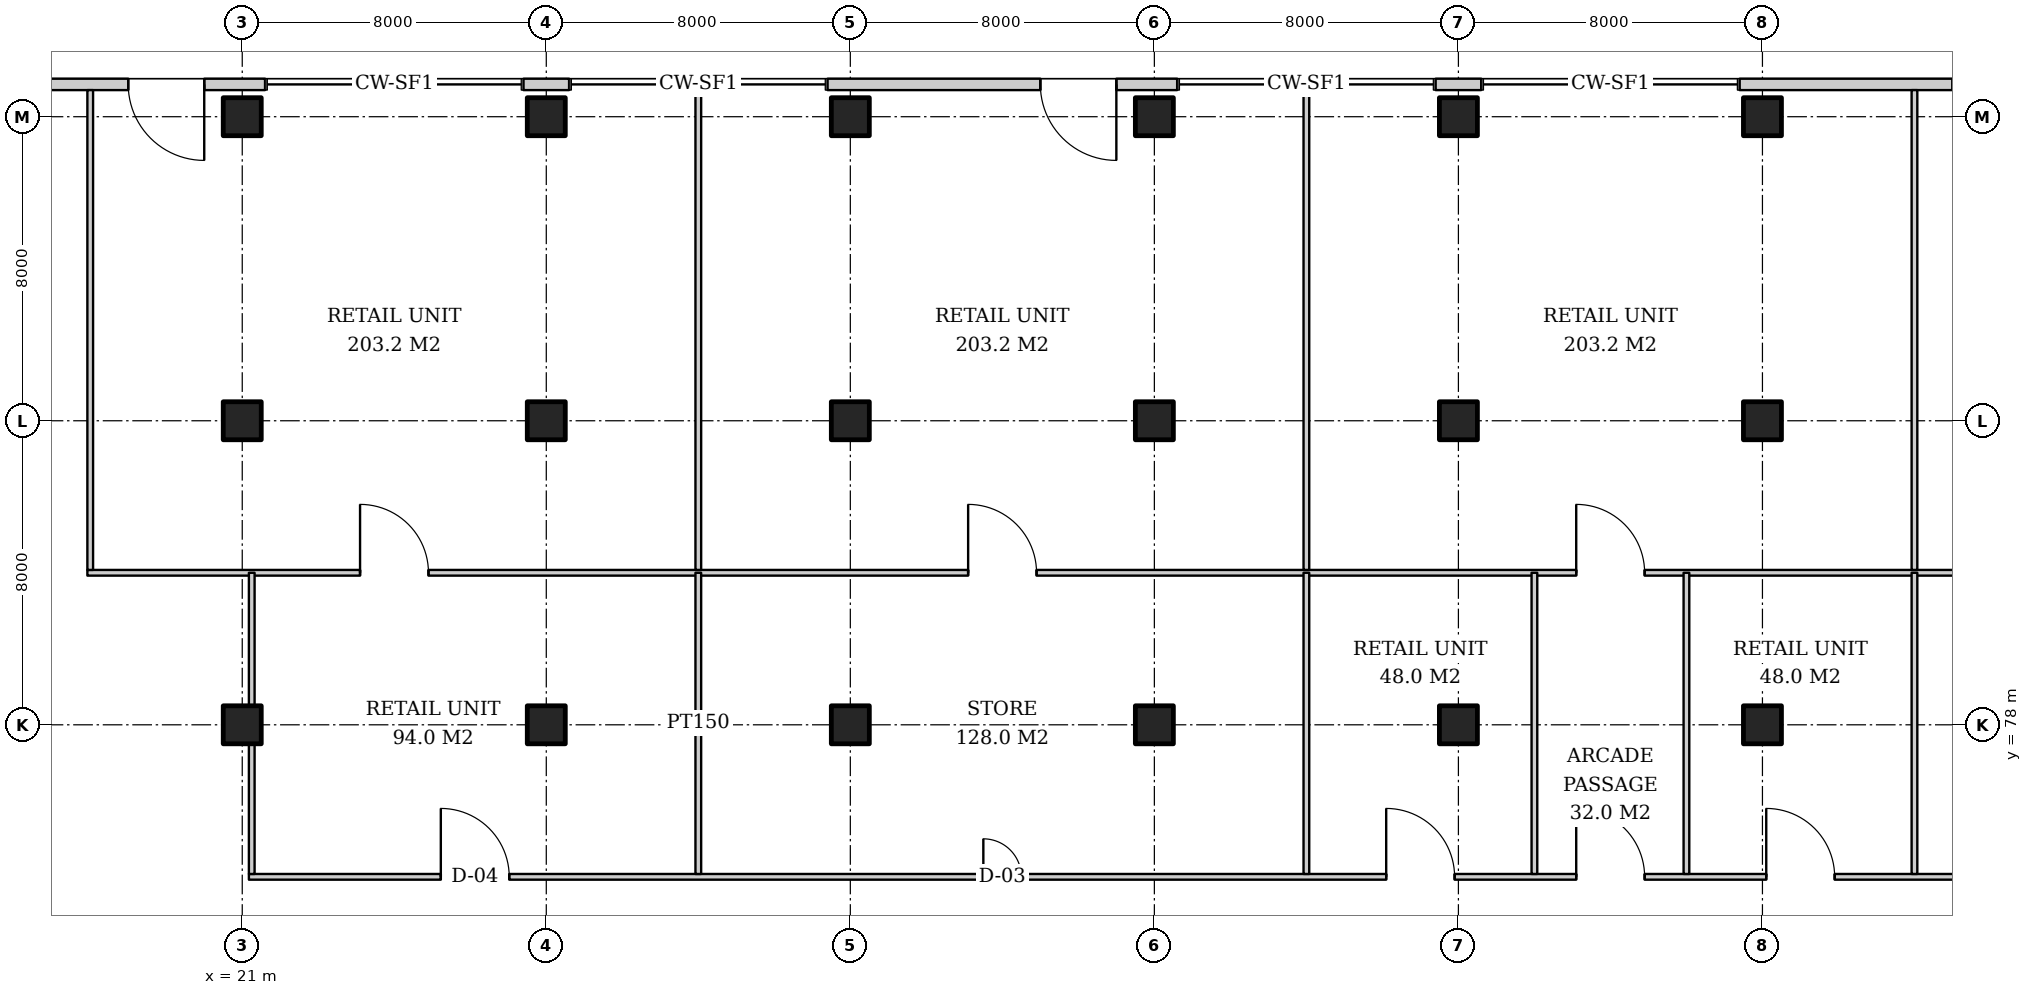
"""IFC4 building model, lengths in metres.
Left out: names, types, materials, properties, quantities, classifications, styles, units other than length and angle.
Written with IfcOpenShell. Run it as: python <this file> out.ifc"""

import sys

from ifc_helpers import new_model, si_unit, direction, frame, frame_2d, origin, origin_2d, place, context, subcontext, project, spatial, rectangle, extrude, element, fill, save


model = new_model("IFC4")
c1 = context("Model", 3, precision=1e-05, world=origin(), true_north=direction((0.0, 1.0)))
c2 = subcontext(c1, "Body", "Model", "MODEL_VIEW")
j1 = project(units=[si_unit("LENGTHUNIT", "METRE"), si_unit("PLANEANGLEUNIT", "RADIAN")], contexts=[c1])
p1 = place(None, origin())
s1 = spatial("IfcSite", under=j1, at=p1, CompositionType="ELEMENT")
p2 = place(p1, origin())
s2 = spatial("IfcBuilding", under=s1, at=p2, CompositionType="ELEMENT")
p3 = place(p2, origin())
s3 = spatial("IfcBuildingStorey", under=s2, at=p3, CompositionType="ELEMENT", Elevation=0.0)
for number, where, z_axis, x_axis in (
    (1, (21.0, 78.0, 0.0), (0.0, 0.0, 1.0), (1.0, 0.0, 0.0)),
    (2, (21.0, 86.0, 0.0), (0.0, 0.0, 1.0), (1.0, 0.0, 0.0)),
    (3, (21.0, 94.0, 0.0), (0.0, 0.0, 1.0), (1.0, 0.0, 0.0)),
    (4, (29.0, 78.0, 0.0), (0.0, 0.0, 1.0), (1.0, 0.0, 0.0)),
    (5, (29.0, 86.0, 0.0), (0.0, 0.0, 1.0), (1.0, 0.0, 0.0)),
    (6, (29.0, 94.0, 0.0), (0.0, 0.0, 1.0), (1.0, 0.0, 0.0)),
    (7, (37.0, 78.0, 0.0), (0.0, 0.0, 1.0), (1.0, 0.0, 0.0)),
    (8, (37.0, 86.0, 0.0), (0.0, 0.0, 1.0), (1.0, 0.0, 0.0)),
    (9, (37.0, 94.0, 0.0), (0.0, 0.0, 1.0), (1.0, 0.0, 0.0)),
    (10, (45.0, 78.0, 0.0), (0.0, 0.0, 1.0), (1.0, 0.0, 0.0)),
    (11, (45.0, 86.0, 0.0), (0.0, 0.0, 1.0), (1.0, 0.0, 0.0)),
    (12, (45.0, 94.0, 0.0), (0.0, 0.0, 1.0), (1.0, 0.0, 0.0)),
    (13, (53.0, 78.0, 0.0), (0.0, 0.0, 1.0), (1.0, 0.0, 0.0)),
    (14, (53.0, 86.0, 0.0), (0.0, 0.0, 1.0), (1.0, 0.0, 0.0)),
    (15, (53.0, 94.0, 0.0), (0.0, 0.0, 1.0), (1.0, 0.0, 0.0)),
    (16, (61.0, 78.0, 0.0), (0.0, 0.0, 1.0), (1.0, 0.0, 0.0)),
    (17, (61.0, 86.0, 0.0), (0.0, 0.0, 1.0), (1.0, 0.0, 0.0)),
    (18, (61.0, 94.0, 0.0), (0.0, 0.0, 1.0), (1.0, 0.0, 0.0)),
):
    element("IfcColumn", number, at=place(p3, frame(where, z_axis=z_axis, x_axis=x_axis)), inside=s3, PredefinedType="COLUMN", context=c2, shape_type="SweptSolid", body=[
        extrude(rectangle(XDim=1.0, YDim=1.0, at=origin_2d()), origin(), (0.0, 0.0, 1.0), 6.0),
    ])
p4 = place(p3, frame((69.6, 94.85, 0.0), z_axis=(0.0, 0.0, 1.0), x_axis=(-1.0, 0.0, 0.0)))
e19 = element("IfcWall", 19, at=p4, inside=s3, PredefinedType="SOLIDWALL", context=c2, shape_type="SweptSolid", body=[
    extrude(rectangle(XDim=9.2, YDim=0.3, at=frame_2d((4.6, 0.0))), origin(), (0.0, 0.0, 1.0), 5.7),
])
p5 = place(p4, frame((1.6, 0.0, 0.0)))
e20 = element("IfcOpeningElement", 20, at=p5, cuts=e19, PredefinedType="OPENING", context=c2, shape_type="SweptSolid", body=[
    extrude(rectangle(XDim=2.0, YDim=2.7, at=frame_2d((1.0, 1.35))), frame((0.0, 0.16, 0.0), z_axis=(0.0, -1.0, 0.0), x_axis=(1.0, 0.0, 0.0)), (0.0, 0.0, 1.0), 0.32),
])
p6 = place(p3, frame((53.6, 94.85, 0.0), z_axis=(0.0, 0.0, 1.0), x_axis=(-1.0, 0.0, 0.0)))
e21 = element("IfcWall", 21, at=p6, inside=s3, PredefinedType="SOLIDWALL", context=c2, shape_type="SweptSolid", body=[
    extrude(rectangle(XDim=1.2, YDim=0.3, at=frame_2d((0.6, 0.0))), origin(), (0.0, 0.0, 1.0), 5.7),
])
p7 = place(p3, frame((45.6, 94.85, 0.0), z_axis=(0.0, 0.0, 1.0), x_axis=(-1.0, 0.0, 0.0)))
e22 = element("IfcWall", 22, at=p7, inside=s3, PredefinedType="SOLIDWALL", context=c2, shape_type="SweptSolid", body=[
    extrude(rectangle(XDim=9.2, YDim=0.3, at=frame_2d((4.6, 0.0))), origin(), (0.0, 0.0, 1.0), 5.7),
])
p8 = place(p7, frame((1.6, 0.0, 0.0)))
e23 = element("IfcOpeningElement", 23, at=p8, cuts=e22, PredefinedType="OPENING", context=c2, shape_type="SweptSolid", body=[
    extrude(rectangle(XDim=2.0, YDim=2.7, at=frame_2d((1.0, 1.35))), frame((0.0, 0.16, 0.0), z_axis=(0.0, -1.0, 0.0), x_axis=(1.0, 0.0, 0.0)), (0.0, 0.0, 1.0), 0.32),
])
p9 = place(p3, frame((29.6, 94.85, 0.0), z_axis=(0.0, 0.0, 1.0), x_axis=(-1.0, 0.0, 0.0)))
e24 = element("IfcWall", 24, at=p9, inside=s3, PredefinedType="SOLIDWALL", context=c2, shape_type="SweptSolid", body=[
    extrude(rectangle(XDim=1.2, YDim=0.3, at=frame_2d((0.6, 0.0))), origin(), (0.0, 0.0, 1.0), 5.7),
])
p10 = place(p3, frame((21.6, 94.85, 0.0), z_axis=(0.0, 0.0, 1.0), x_axis=(-1.0, 0.0, 0.0)))
e25 = element("IfcWall", 25, at=p10, inside=s3, PredefinedType="SOLIDWALL", context=c2, shape_type="SweptSolid", body=[
    extrude(rectangle(XDim=9.2, YDim=0.3, at=frame_2d((4.6, 0.0))), origin(), (0.0, 0.0, 1.0), 5.7),
])
p11 = place(p10, frame((1.6, 0.0, 0.0)))
e26 = element("IfcOpeningElement", 26, at=p11, cuts=e25, PredefinedType="OPENING", context=c2, shape_type="SweptSolid", body=[
    extrude(rectangle(XDim=2.0, YDim=2.7, at=frame_2d((1.0, 1.35))), frame((0.0, 0.16, 0.0), z_axis=(0.0, -1.0, 0.0), x_axis=(1.0, 0.0, 0.0)), (0.0, 0.0, 1.0), 0.32),
])
p12 = place(p3, frame((16.925, 82.0, 0.0), z_axis=(0.0, 0.0, 1.0), x_axis=(1.0, 0.0, 0.0)))
e27 = element("IfcWall", 27, at=p12, inside=s3, PredefinedType="PARTITIONING", context=c2, shape_type="SweptSolid", body=[
    extrude(rectangle(XDim=60.775, YDim=0.15, at=frame_2d((30.387, 0.0))), origin(), (0.0, 0.0, 1.0), 5.7),
])
p13 = place(p12, frame((7.175, 0.0, 0.0)))
e28 = element("IfcOpeningElement", 28, at=p13, cuts=e27, PredefinedType="OPENING", context=c2, shape_type="SweptSolid", body=[
    extrude(rectangle(XDim=1.8, YDim=2.4, at=frame_2d((0.9, 1.2))), frame((0.0, 0.085, 0.0), z_axis=(0.0, -1.0, 0.0), x_axis=(1.0, 0.0, 0.0)), (0.0, 0.0, 1.0), 0.17),
])
p14 = place(p12, frame((23.175, 0.0, 0.0)))
e29 = element("IfcOpeningElement", 29, at=p14, cuts=e27, PredefinedType="OPENING", context=c2, shape_type="SweptSolid", body=[
    extrude(rectangle(XDim=1.8, YDim=2.4, at=frame_2d((0.9, 1.2))), frame((0.0, 0.085, 0.0), z_axis=(0.0, -1.0, 0.0), x_axis=(1.0, 0.0, 0.0)), (0.0, 0.0, 1.0), 0.17),
])
p15 = place(p12, frame((39.175, 0.0, 0.0)))
e30 = element("IfcOpeningElement", 30, at=p15, cuts=e27, PredefinedType="OPENING", context=c2, shape_type="SweptSolid", body=[
    extrude(rectangle(XDim=1.8, YDim=2.4, at=frame_2d((0.9, 1.2))), frame((0.0, 0.085, 0.0), z_axis=(0.0, -1.0, 0.0), x_axis=(1.0, 0.0, 0.0)), (0.0, 0.0, 1.0), 0.17),
])
p16 = place(p12, frame((53.525, 0.0, 0.0)))
e31 = element("IfcOpeningElement", 31, at=p16, cuts=e27, PredefinedType="OPENING", context=c2, shape_type="SweptSolid", body=[
    extrude(rectangle(XDim=1.8, YDim=2.4, at=frame_2d((0.9, 1.2))), frame((0.0, 0.085, 0.0), z_axis=(0.0, -1.0, 0.0), x_axis=(1.0, 0.0, 0.0)), (0.0, 0.0, 1.0), 0.17),
])
for number, where, z_axis, x_axis in (
    (32, (17.0, 82.075, 0.0), (0.0, 0.0, 1.0), (0.0, 1.0, 0.0)),
    (33, (33.0, 82.075, 0.0), (0.0, 0.0, 1.0), (0.0, 1.0, 0.0)),
    (34, (49.0, 82.075, 0.0), (0.0, 0.0, 1.0), (0.0, 1.0, 0.0)),
    (35, (65.0, 82.075, 0.0), (0.0, 0.0, 1.0), (0.0, 1.0, 0.0)),
):
    element("IfcWall", number, at=place(p3, frame(where, z_axis=z_axis, x_axis=x_axis)), inside=s3, PredefinedType="PARTITIONING", context=c2, shape_type="SweptSolid", body=[
        extrude(rectangle(XDim=12.625, YDim=0.15, at=frame_2d((6.312, 0.0))), origin(), (0.0, 0.0, 1.0), 4.2),
    ])
p17 = place(p3, frame((21.175, 74.0, 0.0), z_axis=(0.0, 0.0, 1.0), x_axis=(1.0, 0.0, 0.0)))
e36 = element("IfcWall", 36, at=p17, inside=s3, PredefinedType="PARTITIONING", context=c2, shape_type="SweptSolid", body=[
    extrude(rectangle(XDim=56.525, YDim=0.15, at=frame_2d((28.262, 0.0))), origin(), (0.0, 0.0, 1.0), 5.7),
])
p18 = place(p17, frame((5.05, 0.0, 0.0)))
e37 = element("IfcOpeningElement", 37, at=p18, cuts=e36, PredefinedType="OPENING", context=c2, shape_type="SweptSolid", body=[
    extrude(rectangle(XDim=1.8, YDim=2.4, at=frame_2d((0.9, 1.2))), frame((0.0, 0.085, 0.0), z_axis=(0.0, -1.0, 0.0), x_axis=(1.0, 0.0, 0.0)), (0.0, 0.0, 1.0), 0.17),
])
p19 = place(p17, frame((19.325, 0.0, 0.0)))
e38 = element("IfcOpeningElement", 38, at=p19, cuts=e36, PredefinedType="OPENING", context=c2, shape_type="SweptSolid", body=[
    extrude(rectangle(XDim=1.0, YDim=2.1, at=frame_2d((0.5, 1.05))), frame((0.0, 0.085, 0.0), z_axis=(0.0, -1.0, 0.0), x_axis=(1.0, 0.0, 0.0)), (0.0, 0.0, 1.0), 0.17),
])
p20 = place(p17, frame((29.925, 0.0, 0.0)))
e39 = element("IfcOpeningElement", 39, at=p20, cuts=e36, PredefinedType="OPENING", context=c2, shape_type="SweptSolid", body=[
    extrude(rectangle(XDim=1.8, YDim=2.4, at=frame_2d((0.9, 1.2))), frame((0.0, 0.085, 0.0), z_axis=(0.0, -1.0, 0.0), x_axis=(1.0, 0.0, 0.0)), (0.0, 0.0, 1.0), 0.17),
])
p21 = place(p17, frame((34.925, 0.0, 0.0)))
e40 = element("IfcOpeningElement", 40, at=p21, cuts=e36, PredefinedType="OPENING", context=c2, shape_type="SweptSolid", body=[
    extrude(rectangle(XDim=1.8, YDim=2.4, at=frame_2d((0.9, 1.2))), frame((0.0, 0.085, 0.0), z_axis=(0.0, -1.0, 0.0), x_axis=(1.0, 0.0, 0.0)), (0.0, 0.0, 1.0), 0.17),
])
p22 = place(p17, frame((39.925, 0.0, 0.0)))
e41 = element("IfcOpeningElement", 41, at=p22, cuts=e36, PredefinedType="OPENING", context=c2, shape_type="SweptSolid", body=[
    extrude(rectangle(XDim=1.8, YDim=2.4, at=frame_2d((0.9, 1.2))), frame((0.0, 0.085, 0.0), z_axis=(0.0, -1.0, 0.0), x_axis=(1.0, 0.0, 0.0)), (0.0, 0.0, 1.0), 0.17),
])
p23 = place(p17, frame((49.675, 0.0, 0.0)))
e42 = element("IfcOpeningElement", 42, at=p23, cuts=e36, PredefinedType="OPENING", context=c2, shape_type="SweptSolid", body=[
    extrude(rectangle(XDim=1.0, YDim=2.1, at=frame_2d((0.5, 1.05))), frame((0.0, 0.085, 0.0), z_axis=(0.0, -1.0, 0.0), x_axis=(1.0, 0.0, 0.0)), (0.0, 0.0, 1.0), 0.17),
])
p24 = place(p3, frame((21.25, 74.075, 0.0), z_axis=(0.0, 0.0, 1.0), x_axis=(0.0, 1.0, 0.0)))
e43 = element("IfcWall", 43, at=p24, inside=s3, PredefinedType="PARTITIONING", context=c2, shape_type="SweptSolid", body=[
    extrude(rectangle(XDim=3.425, YDim=0.15, at=frame_2d((1.712, 0.0))), origin(), (0.0, 0.0, 1.0), 5.7),
])
p25 = place(p3, frame((21.25, 78.5, 0.0), z_axis=(0.0, 0.0, 1.0), x_axis=(0.0, 1.0, 0.0)))
e44 = element("IfcWall", 44, at=p25, inside=s3, PredefinedType="PARTITIONING", context=c2, shape_type="SweptSolid", body=[
    extrude(rectangle(XDim=3.5, YDim=0.15, at=frame_2d((1.75, 0.0))), origin(), (0.0, 0.0, 1.0), 5.7),
])
for number, where, z_axis, x_axis in (
    (45, (33.0, 74.075, 0.0), (0.0, 0.0, 1.0), (0.0, 1.0, 0.0)),
    (46, (49.0, 74.075, 0.0), (0.0, 0.0, 1.0), (0.0, 1.0, 0.0)),
    (47, (55.0, 74.075, 0.0), (0.0, 0.0, 1.0), (0.0, 1.0, 0.0)),
    (48, (59.0, 74.075, 0.0), (0.0, 0.0, 1.0), (0.0, 1.0, 0.0)),
    (49, (65.0, 74.075, 0.0), (0.0, 0.0, 1.0), (0.0, 1.0, 0.0)),
):
    element("IfcWall", number, at=place(p3, frame(where, z_axis=z_axis, x_axis=x_axis)), inside=s3, PredefinedType="PARTITIONING", context=c2, shape_type="SweptSolid", body=[
        extrude(rectangle(XDim=7.925, YDim=0.15, at=frame_2d((3.962, 0.0))), origin(), (0.0, 0.0, 1.0), 5.7),
    ])
p26 = place(p8, origin())
e50 = element("IfcDoor", 50, at=p26, inside=s3, OperationType="DOUBLE_DOOR_SINGLE_SWING", PredefinedType="DOOR", context=c2, shape_type="SweptSolid", body=[
    extrude(rectangle(XDim=2.0, YDim=2.7, at=frame_2d((1.0, 1.35))), frame((0.0, 0.025, 0.0), z_axis=(0.0, -1.0, 0.0), x_axis=(1.0, 0.0, 0.0)), (0.0, 0.0, 1.0), 0.05),
])
fill(e23, e50)
p27 = place(p11, origin())
e51 = element("IfcDoor", 51, at=p27, inside=s3, OperationType="DOUBLE_DOOR_SINGLE_SWING", PredefinedType="DOOR", context=c2, shape_type="SweptSolid", body=[
    extrude(rectangle(XDim=2.0, YDim=2.7, at=frame_2d((1.0, 1.35))), frame((0.0, 0.025, 0.0), z_axis=(0.0, -1.0, 0.0), x_axis=(1.0, 0.0, 0.0)), (0.0, 0.0, 1.0), 0.05),
])
fill(e26, e51)
p28 = place(p13, origin())
e52 = element("IfcDoor", 52, at=p28, inside=s3, OperationType="DOUBLE_DOOR_SINGLE_SWING", PredefinedType="DOOR", context=c2, shape_type="SweptSolid", body=[
    extrude(rectangle(XDim=1.8, YDim=2.4, at=frame_2d((0.9, 1.2))), frame((0.0, 0.025, 0.0), z_axis=(0.0, -1.0, 0.0), x_axis=(1.0, 0.0, 0.0)), (0.0, 0.0, 1.0), 0.05),
])
fill(e28, e52)
p29 = place(p14, origin())
e53 = element("IfcDoor", 53, at=p29, inside=s3, OperationType="DOUBLE_DOOR_SINGLE_SWING", PredefinedType="DOOR", context=c2, shape_type="SweptSolid", body=[
    extrude(rectangle(XDim=1.8, YDim=2.4, at=frame_2d((0.9, 1.2))), frame((0.0, 0.025, 0.0), z_axis=(0.0, -1.0, 0.0), x_axis=(1.0, 0.0, 0.0)), (0.0, 0.0, 1.0), 0.05),
])
fill(e29, e53)
p30 = place(p15, origin())
e54 = element("IfcDoor", 54, at=p30, inside=s3, OperationType="DOUBLE_DOOR_SINGLE_SWING", PredefinedType="DOOR", context=c2, shape_type="SweptSolid", body=[
    extrude(rectangle(XDim=1.8, YDim=2.4, at=frame_2d((0.9, 1.2))), frame((0.0, 0.025, 0.0), z_axis=(0.0, -1.0, 0.0), x_axis=(1.0, 0.0, 0.0)), (0.0, 0.0, 1.0), 0.05),
])
fill(e30, e54)
p31 = place(p18, origin())
e55 = element("IfcDoor", 55, at=p31, inside=s3, OperationType="DOUBLE_DOOR_SINGLE_SWING", PredefinedType="DOOR", context=c2, shape_type="SweptSolid", body=[
    extrude(rectangle(XDim=1.8, YDim=2.4, at=frame_2d((0.9, 1.2))), frame((0.0, 0.025, 0.0), z_axis=(0.0, -1.0, 0.0), x_axis=(1.0, 0.0, 0.0)), (0.0, 0.0, 1.0), 0.05),
])
fill(e37, e55)
p32 = place(p19, origin())
e56 = element("IfcDoor", 56, at=p32, inside=s3, OperationType="SINGLE_SWING_LEFT", PredefinedType="DOOR", context=c2, shape_type="SweptSolid", body=[
    extrude(rectangle(XDim=1.0, YDim=2.1, at=frame_2d((0.5, 1.05))), frame((0.0, 0.025, 0.0), z_axis=(0.0, -1.0, 0.0), x_axis=(1.0, 0.0, 0.0)), (0.0, 0.0, 1.0), 0.05),
])
fill(e38, e56)
p33 = place(p20, origin())
e57 = element("IfcDoor", 57, at=p33, inside=s3, OperationType="DOUBLE_DOOR_SINGLE_SWING", PredefinedType="DOOR", context=c2, shape_type="SweptSolid", body=[
    extrude(rectangle(XDim=1.8, YDim=2.4, at=frame_2d((0.9, 1.2))), frame((0.0, 0.025, 0.0), z_axis=(0.0, -1.0, 0.0), x_axis=(1.0, 0.0, 0.0)), (0.0, 0.0, 1.0), 0.05),
])
fill(e39, e57)
p34 = place(p21, origin())
e58 = element("IfcDoor", 58, at=p34, inside=s3, OperationType="DOUBLE_DOOR_SINGLE_SWING", PredefinedType="DOOR", context=c2, shape_type="SweptSolid", body=[
    extrude(rectangle(XDim=1.8, YDim=2.4, at=frame_2d((0.9, 1.2))), frame((0.0, 0.025, 0.0), z_axis=(0.0, -1.0, 0.0), x_axis=(1.0, 0.0, 0.0)), (0.0, 0.0, 1.0), 0.05),
])
fill(e40, e58)
p35 = place(p22, origin())
e59 = element("IfcDoor", 59, at=p35, inside=s3, OperationType="DOUBLE_DOOR_SINGLE_SWING", PredefinedType="DOOR", context=c2, shape_type="SweptSolid", body=[
    extrude(rectangle(XDim=1.8, YDim=2.4, at=frame_2d((0.9, 1.2))), frame((0.0, 0.025, 0.0), z_axis=(0.0, -1.0, 0.0), x_axis=(1.0, 0.0, 0.0)), (0.0, 0.0, 1.0), 0.05),
])
fill(e41, e59)
save(model, sys.argv[1])
